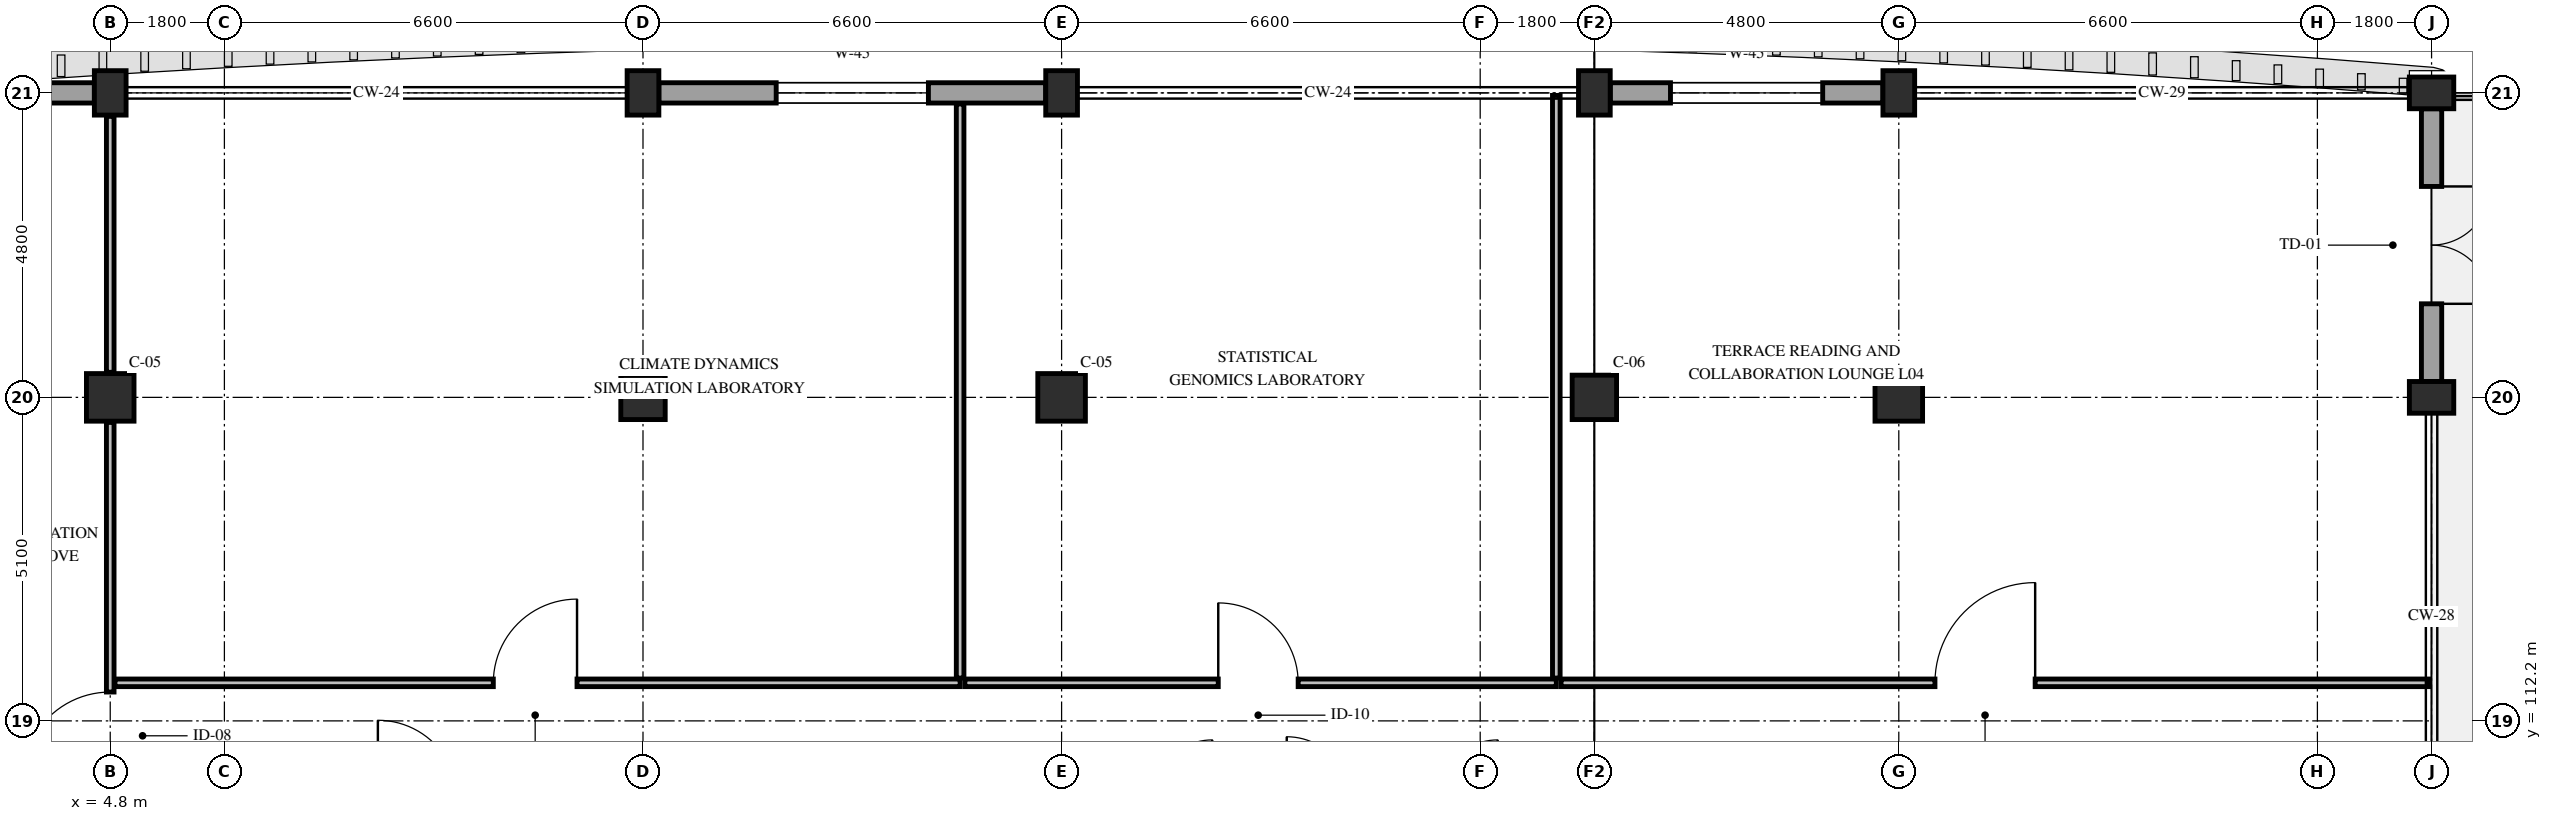
"""IFC4 building model, lengths in metres.
Left out: names, types, materials, properties, quantities, classifications, styles, units other than length and angle.
Written with IfcOpenShell. Run it as: python <this file> out.ifc"""

import sys

from ifc_helpers import new_model, si_unit, direction, frame, frame_2d, origin, origin_2d, place, context, subcontext, project, spatial, rectangle, extrude, element, fill, save


model = new_model("IFC4")
c1 = context("Model", 3, precision=1e-05, world=origin(), true_north=direction((0.0, 1.0)))
c2 = subcontext(c1, "Body", "Model", "MODEL_VIEW")
j1 = project(units=[si_unit("LENGTHUNIT", "METRE"), si_unit("PLANEANGLEUNIT", "RADIAN")], contexts=[c1])
p1 = place(None, origin())
s1 = spatial("IfcSite", under=j1, at=p1, CompositionType="ELEMENT")
p2 = place(p1, origin())
s2 = spatial("IfcBuilding", under=s1, at=p2, CompositionType="ELEMENT")
p3 = place(p2, frame((0.0, 0.0, 19.8)))
s3 = spatial("IfcBuildingStorey", under=s2, at=p3, CompositionType="ELEMENT", Elevation=19.8)
p4 = place(p3, frame((4.8, 117.3, 0.0), z_axis=(0.0, 0.0, 1.0), x_axis=(1.0, 0.0, 0.0)))
e1 = element("IfcColumn", 1, at=p4, inside=s3, PredefinedType="COLUMN", context=c2, shape_type="SweptSolid", body=[
    extrude(rectangle(XDim=0.75, YDim=0.75, at=origin_2d()), origin(), (0.0, 0.0, 1.0), 4.8),
])
p5 = place(p3, frame((4.8, 122.1, 0.0), z_axis=(0.0, 0.0, 1.0), x_axis=(1.0, 0.0, 0.0)))
e2 = element("IfcColumn", 2, at=p5, inside=s3, PredefinedType="PILASTER", context=c2, shape_type="SweptSolid", body=[
    extrude(rectangle(XDim=0.5, YDim=0.7, at=origin_2d()), origin(), (0.0, 0.0, 1.0), 4.8),
])
p6 = place(p3, frame((13.2, 117.3, 0.0), z_axis=(0.0, 0.0, 1.0), x_axis=(1.0, 0.0, 0.0)))
e3 = element("IfcColumn", 3, at=p6, inside=s3, PredefinedType="COLUMN", context=c2, shape_type="SweptSolid", body=[
    extrude(rectangle(XDim=0.7, YDim=0.7, at=origin_2d()), origin(), (0.0, 0.0, 1.0), 4.8),
])
p7 = place(p3, frame((13.2, 122.1, 0.0), z_axis=(0.0, 0.0, 1.0), x_axis=(1.0, 0.0, 0.0)))
e4 = element("IfcColumn", 4, at=p7, inside=s3, PredefinedType="PILASTER", context=c2, shape_type="SweptSolid", body=[
    extrude(rectangle(XDim=0.5, YDim=0.7, at=origin_2d()), origin(), (0.0, 0.0, 1.0), 4.8),
])
p8 = place(p3, frame((19.8, 117.3, 0.0), z_axis=(0.0, 0.0, 1.0), x_axis=(1.0, 0.0, 0.0)))
e5 = element("IfcColumn", 5, at=p8, inside=s3, PredefinedType="COLUMN", context=c2, shape_type="SweptSolid", body=[
    extrude(rectangle(XDim=0.75, YDim=0.75, at=origin_2d()), origin(), (0.0, 0.0, 1.0), 4.8),
])
p9 = place(p3, frame((19.8, 122.1, 0.0), z_axis=(0.0, 0.0, 1.0), x_axis=(1.0, 0.0, 0.0)))
e6 = element("IfcColumn", 6, at=p9, inside=s3, PredefinedType="PILASTER", context=c2, shape_type="SweptSolid", body=[
    extrude(rectangle(XDim=0.5, YDim=0.7, at=origin_2d()), origin(), (0.0, 0.0, 1.0), 4.8),
])
p10 = place(p3, frame((28.2, 117.3, 0.0), z_axis=(0.0, 0.0, 1.0), x_axis=(1.0, 0.0, 0.0)))
e7 = element("IfcColumn", 7, at=p10, inside=s3, PredefinedType="COLUMN", context=c2, shape_type="SweptSolid", body=[
    extrude(rectangle(XDim=0.7, YDim=0.7, at=origin_2d()), origin(), (0.0, 0.0, 1.0), 4.8),
])
p11 = place(p3, frame((28.2, 122.1, 0.0), z_axis=(0.0, 0.0, 1.0), x_axis=(1.0, 0.0, 0.0)))
e8 = element("IfcColumn", 8, at=p11, inside=s3, PredefinedType="PILASTER", context=c2, shape_type="SweptSolid", body=[
    extrude(rectangle(XDim=0.5, YDim=0.7, at=origin_2d()), origin(), (0.0, 0.0, 1.0), 4.8),
])
p12 = place(p3, frame((33.0, 117.3, 0.0), z_axis=(0.0, 0.0, 1.0), x_axis=(1.0, 0.0, 0.0)))
e9 = element("IfcColumn", 9, at=p12, inside=s3, PredefinedType="COLUMN", context=c2, shape_type="SweptSolid", body=[
    extrude(rectangle(XDim=0.75, YDim=0.75, at=origin_2d()), origin(), (0.0, 0.0, 1.0), 4.8),
])
for number, where, z_axis, x_axis in (
    (10, (33.0, 122.1, 0.0), (0.0, 0.0, 1.0), (1.0, 0.0, 0.0)),
    (11, (41.4, 117.3, 0.0), (0.0, 0.0, 1.0), (0.0, 1.0, 0.0)),
    (12, (41.4, 122.1, 0.0), (0.0, 0.0, 1.0), (0.0, 1.0, 0.0)),
):
    element("IfcColumn", number, at=place(p3, frame(where, z_axis=z_axis, x_axis=x_axis)), inside=s3, PredefinedType="PILASTER", context=c2, shape_type="SweptSolid", body=[
        extrude(rectangle(XDim=0.5, YDim=0.7, at=origin_2d()), origin(), (0.0, 0.0, 1.0), 4.8),
    ])
p13 = place(p3, frame((0.35, 122.1, 0.0), z_axis=(0.0, 0.0, 1.0), x_axis=(1.0, 0.0, 0.0)))
e13 = element("IfcWall", 13, at=p13, inside=s3, PredefinedType="STANDARD", context=c2, shape_type="SweptSolid", body=[
    extrude(rectangle(XDim=4.2, YDim=0.32, at=frame_2d((2.1, 0.0))), origin(), (0.0, 0.0, 1.0), 3.95),
])
p14 = place(p13, frame((0.9, 0.0, 0.85)))
e14 = element("IfcOpeningElement", 14, at=p14, cuts=e13, PredefinedType="OPENING", context=c2, shape_type="SweptSolid", body=[
    extrude(rectangle(XDim=2.4, YDim=2.24, at=frame_2d((1.2, 1.12))), frame((0.0, 0.175, 0.0), z_axis=(0.0, -1.0, 0.0), x_axis=(1.0, 0.0, 0.0)), (0.0, 0.0, 1.0), 0.35),
])
p15 = place(p3, frame((13.45, 122.1, 0.0), z_axis=(0.0, 0.0, 1.0), x_axis=(1.0, 0.0, 0.0)))
e15 = element("IfcWall", 15, at=p15, inside=s3, PredefinedType="STANDARD", context=c2, shape_type="SweptSolid", body=[
    extrude(rectangle(XDim=6.1, YDim=0.32, at=frame_2d((3.05, 0.0))), origin(), (0.0, 0.0, 1.0), 3.93),
])
p16 = place(p15, frame((1.85, 0.0, 0.85)))
e16 = element("IfcOpeningElement", 16, at=p16, cuts=e15, PredefinedType="OPENING", context=c2, shape_type="SweptSolid", body=[
    extrude(rectangle(XDim=2.4, YDim=2.24, at=frame_2d((1.2, 1.12))), frame((0.0, 0.175, 0.0), z_axis=(0.0, -1.0, 0.0), x_axis=(1.0, 0.0, 0.0)), (0.0, 0.0, 1.0), 0.35),
])
p17 = place(p3, frame((28.45, 122.1, 0.0), z_axis=(0.0, 0.0, 1.0), x_axis=(1.0, 0.0, 0.0)))
e17 = element("IfcWall", 17, at=p17, inside=s3, PredefinedType="STANDARD", context=c2, shape_type="SweptSolid", body=[
    extrude(rectangle(XDim=4.3, YDim=0.32, at=frame_2d((2.15, 0.0))), origin(), (0.0, 0.0, 1.0), 3.95),
])
p18 = place(p17, frame((0.95, 0.0, 0.85)))
e18 = element("IfcOpeningElement", 18, at=p18, cuts=e17, PredefinedType="OPENING", context=c2, shape_type="SweptSolid", body=[
    extrude(rectangle(XDim=2.4, YDim=2.24, at=frame_2d((1.2, 1.12))), frame((0.0, 0.175, 0.0), z_axis=(0.0, -1.0, 0.0), x_axis=(1.0, 0.0, 0.0)), (0.0, 0.0, 1.0), 0.35),
])
p19 = place(p3, frame((41.4, 121.85, 0.0), z_axis=(0.0, 0.0, 1.0), x_axis=(0.0, -1.0, 0.0)))
e19 = element("IfcWall", 19, at=p19, inside=s3, PredefinedType="STANDARD", context=c2, shape_type="SweptSolid", body=[
    extrude(rectangle(XDim=4.3, YDim=0.32, at=frame_2d((2.15, 0.0))), origin(), (0.0, 0.0, 1.0), 3.95),
])
p20 = place(p19, frame((1.225, 0.0, 0.0)))
e20 = element("IfcOpeningElement", 20, at=p20, cuts=e19, PredefinedType="OPENING", context=c2, shape_type="SweptSolid", body=[
    extrude(rectangle(XDim=1.85, YDim=2.35, at=frame_2d((0.925, 1.175))), frame((0.0, 0.175, 0.0), z_axis=(0.0, -1.0, 0.0), x_axis=(1.0, 0.0, 0.0)), (0.0, 0.0, 1.0), 0.35),
])
p21 = place(p3, frame((4.8, 111.025, 0.0), z_axis=(0.0, 0.0, 1.0), x_axis=(0.0, 1.0, 0.0)))
e21 = element("IfcWall", 21, at=p21, inside=s3, PredefinedType="PARTITIONING", context=c2, shape_type="SweptSolid", body=[
    extrude(rectangle(XDim=5.88, YDim=0.12, at=frame_2d((2.94, 0.0))), origin(), (0.0, 0.0, 1.0), 4.13),
])
p22 = place(p21, frame((0.25, 0.0, 0.0)))
e22 = element("IfcOpeningElement", 22, at=p22, cuts=e21, PredefinedType="OPENING", context=c2, shape_type="SweptSolid", body=[
    extrude(rectangle(XDim=1.38, YDim=2.25, at=frame_2d((0.69, 1.125))), frame((0.0, 0.075, 0.0), z_axis=(0.0, -1.0, 0.0), x_axis=(1.0, 0.0, 0.0)), (0.0, 0.0, 1.0), 0.15),
])
p23 = place(p3, frame((4.8, 117.695, 0.0), z_axis=(0.0, 0.0, 1.0), x_axis=(0.0, 1.0, 0.0)))
e23 = element("IfcWall", 23, at=p23, inside=s3, PredefinedType="PARTITIONING", context=c2, shape_type="SweptSolid", body=[
    extrude(rectangle(XDim=4.035, YDim=0.12, at=frame_2d((2.018, 0.0))), origin(), (0.0, 0.0, 1.0), 4.13),
])
p24 = place(p3, frame((4.875, 112.8, 0.0), z_axis=(0.0, 0.0, 1.0), x_axis=(1.0, 0.0, 0.0)))
e24 = element("IfcWall", 24, at=p24, inside=s3, PredefinedType="PARTITIONING", context=c2, shape_type="SweptSolid", body=[
    extrude(rectangle(XDim=13.325, YDim=0.12, at=frame_2d((6.663, 0.0))), origin(), (0.0, 0.0, 1.0), 4.13),
])
p25 = place(p24, frame((5.965, 0.0, 0.0)))
e25 = element("IfcOpeningElement", 25, at=p25, cuts=e24, PredefinedType="OPENING", context=c2, shape_type="SweptSolid", body=[
    extrude(rectangle(XDim=1.32, YDim=2.2, at=frame_2d((0.66, 1.1))), frame((0.0, 0.075, 0.0), z_axis=(0.0, -1.0, 0.0), x_axis=(1.0, 0.0, 0.0)), (0.0, 0.0, 1.0), 0.15),
])
p26 = place(p3, frame((18.2, 112.875, 0.0), z_axis=(0.0, 0.0, 1.0), x_axis=(0.0, 1.0, 0.0)))
e26 = element("IfcWall", 26, at=p26, inside=s3, PredefinedType="PARTITIONING", context=c2, shape_type="SweptSolid", body=[
    extrude(rectangle(XDim=9.05, YDim=0.12, at=frame_2d((4.525, 0.0))), origin(), (0.0, 0.0, 1.0), 3.93),
])
p27 = place(p3, frame((18.275, 112.8, 0.0), z_axis=(0.0, 0.0, 1.0), x_axis=(1.0, 0.0, 0.0)))
e27 = element("IfcWall", 27, at=p27, inside=s3, PredefinedType="PARTITIONING", context=c2, shape_type="SweptSolid", body=[
    extrude(rectangle(XDim=9.325, YDim=0.12, at=frame_2d((4.663, 0.0))), origin(), (0.0, 0.0, 1.0), 4.13),
])
p28 = place(p27, frame((3.995, 0.0, 0.0)))
e28 = element("IfcOpeningElement", 28, at=p28, cuts=e27, PredefinedType="OPENING", context=c2, shape_type="SweptSolid", body=[
    extrude(rectangle(XDim=1.26, YDim=2.2, at=frame_2d((0.63, 1.1))), frame((0.0, 0.075, 0.0), z_axis=(0.0, -1.0, 0.0), x_axis=(1.0, 0.0, 0.0)), (0.0, 0.0, 1.0), 0.15),
])
p29 = place(p3, frame((27.6, 112.875, 0.0), z_axis=(0.0, 0.0, 1.0), x_axis=(0.0, 1.0, 0.0)))
e29 = element("IfcWall", 29, at=p29, inside=s3, PredefinedType="PARTITIONING", context=c2, shape_type="SweptSolid", body=[
    extrude(rectangle(XDim=9.185, YDim=0.12, at=frame_2d((4.593, 0.0))), origin(), (0.0, 0.0, 1.0), 3.83),
])
p30 = place(p3, frame((27.675, 112.8, 0.0), z_axis=(0.0, 0.0, 1.0), x_axis=(1.0, 0.0, 0.0)))
e30 = element("IfcWall", 30, at=p30, inside=s3, PredefinedType="PARTITIONING", context=c2, shape_type="SweptSolid", body=[
    extrude(rectangle(XDim=13.685, YDim=0.12, at=frame_2d((6.843, 0.0))), origin(), (0.0, 0.0, 1.0), 4.08),
])
p31 = place(p30, frame((5.895, 0.0, 0.0)))
e31 = element("IfcOpeningElement", 31, at=p31, cuts=e30, PredefinedType="OPENING", context=c2, shape_type="SweptSolid", body=[
    extrude(rectangle(XDim=1.58, YDim=2.3, at=frame_2d((0.79, 1.15))), frame((0.0, 0.075, 0.0), z_axis=(0.0, -1.0, 0.0), x_axis=(1.0, 0.0, 0.0)), (0.0, 0.0, 1.0), 0.15),
])
p32 = place(p16, origin())
e32 = element("IfcWindow", 32, at=p32, inside=s3, PartitioningType="DOUBLE_PANEL_VERTICAL", PredefinedType="WINDOW", context=c2, shape_type="SweptSolid", body=[
    extrude(rectangle(XDim=2.4, YDim=2.24, at=frame_2d((1.2, 1.12))), frame((0.0, 0.03, 0.0), z_axis=(0.0, -1.0, 0.0), x_axis=(1.0, 0.0, 0.0)), (0.0, 0.0, 1.0), 0.06),
])
fill(e16, e32)
p33 = place(p18, origin())
e33 = element("IfcWindow", 33, at=p33, inside=s3, PartitioningType="DOUBLE_PANEL_VERTICAL", PredefinedType="WINDOW", context=c2, shape_type="SweptSolid", body=[
    extrude(rectangle(XDim=2.4, YDim=2.24, at=frame_2d((1.2, 1.12))), frame((0.0, 0.03, 0.0), z_axis=(0.0, -1.0, 0.0), x_axis=(1.0, 0.0, 0.0)), (0.0, 0.0, 1.0), 0.06),
])
fill(e18, e33)
p34 = place(p20, origin())
e34 = element("IfcDoor", 34, at=p34, inside=s3, OperationType="DOUBLE_DOOR_SINGLE_SWING", PredefinedType="DOOR", context=c2, shape_type="SweptSolid", body=[
    extrude(rectangle(XDim=1.85, YDim=2.35, at=frame_2d((0.925, 1.175))), frame((0.0, 0.025, 0.0), z_axis=(0.0, -1.0, 0.0), x_axis=(1.0, 0.0, 0.0)), (0.0, 0.0, 1.0), 0.05),
])
fill(e20, e34)
p35 = place(p22, origin())
e35 = element("IfcDoor", 35, at=p35, inside=s3, OperationType="SINGLE_SWING_LEFT", PredefinedType="DOOR", context=c2, shape_type="SweptSolid", body=[
    extrude(rectangle(XDim=1.38, YDim=2.25, at=frame_2d((0.69, 1.125))), frame((0.0, 0.025, 0.0), z_axis=(0.0, -1.0, 0.0), x_axis=(1.0, 0.0, 0.0)), (0.0, 0.0, 1.0), 0.05),
])
fill(e22, e35)
p36 = place(p25, origin())
e36 = element("IfcDoor", 36, at=p36, inside=s3, OperationType="SINGLE_SWING_RIGHT", PredefinedType="DOOR", context=c2, shape_type="SweptSolid", body=[
    extrude(rectangle(XDim=1.32, YDim=2.2, at=frame_2d((0.66, 1.1))), frame((0.0, 0.025, 0.0), z_axis=(0.0, -1.0, 0.0), x_axis=(1.0, 0.0, 0.0)), (0.0, 0.0, 1.0), 0.05),
])
fill(e25, e36)
p37 = place(p28, origin())
e37 = element("IfcDoor", 37, at=p37, inside=s3, OperationType="SINGLE_SWING_LEFT", PredefinedType="DOOR", context=c2, shape_type="SweptSolid", body=[
    extrude(rectangle(XDim=1.26, YDim=2.2, at=frame_2d((0.63, 1.1))), frame((0.0, 0.025, 0.0), z_axis=(0.0, -1.0, 0.0), x_axis=(1.0, 0.0, 0.0)), (0.0, 0.0, 1.0), 0.05),
])
fill(e28, e37)
p38 = place(p31, origin())
e38 = element("IfcDoor", 38, at=p38, inside=s3, OperationType="SINGLE_SWING_RIGHT", PredefinedType="DOOR", context=c2, shape_type="SweptSolid", body=[
    extrude(rectangle(XDim=1.58, YDim=2.3, at=frame_2d((0.79, 1.15))), frame((0.0, 0.025, 0.0), z_axis=(0.0, -1.0, 0.0), x_axis=(1.0, 0.0, 0.0)), (0.0, 0.0, 1.0), 0.05),
])
fill(e31, e38)
save(model, sys.argv[1])
